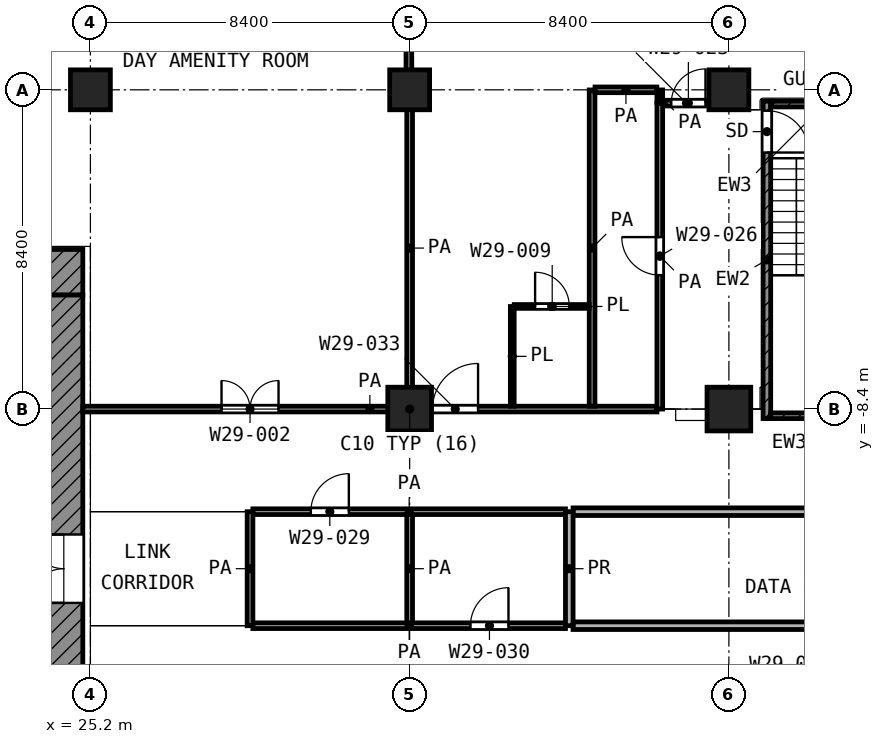
"""IFC4 building model, lengths in metres.
Left out: names, types, materials, properties, quantities, classifications, styles, units other than length and angle.
Written with IfcOpenShell. Run it as: python <this file> out.ifc"""

import sys

from ifc_helpers import new_model, si_unit, direction, frame, frame_2d, origin, origin_2d, place, context, subcontext, project, spatial, rectangle, extrude, element, fill, save


model = new_model("IFC4")
c1 = context("Model", 3, precision=1e-05, world=origin(), true_north=direction((0.0, 1.0)))
c2 = subcontext(c1, "Body", "Model", "MODEL_VIEW")
j1 = project(units=[si_unit("LENGTHUNIT", "METRE"), si_unit("PLANEANGLEUNIT", "RADIAN")], contexts=[c1])
p1 = place(None, origin())
s1 = spatial("IfcSite", under=j1, at=p1, CompositionType="ELEMENT")
p2 = place(p1, origin())
s2 = spatial("IfcBuilding", under=s1, at=p2, CompositionType="ELEMENT")
p3 = place(p2, frame((0.0, 0.0, 128.2)))
s3 = spatial("IfcBuildingStorey", under=s2, at=p3, CompositionType="ELEMENT", Elevation=128.2)
for number, where, z_axis, x_axis in (
    (1, (25.2, 0.0, 0.0), (0.0, 0.0, 1.0), (1.0, 0.0, 0.0)),
    (2, (33.6, 0.0, 0.0), (0.0, 0.0, 1.0), (1.0, 0.0, 0.0)),
    (3, (42.0, 0.0, 0.0), (0.0, 0.0, 1.0), (1.0, 0.0, 0.0)),
):
    element("IfcColumn", number, at=place(p3, frame(where, z_axis=z_axis, x_axis=x_axis)), inside=s3, PredefinedType="COLUMN", context=c2, shape_type="SweptSolid", body=[
        extrude(rectangle(XDim=1.05, YDim=1.05, at=origin_2d()), origin(), (0.0, 0.0, 1.0), 4.2),
    ])
for number, where, z_axis, x_axis in (
    (4, (33.6, -8.4, 0.0), (0.0, 0.0, 1.0), (1.0, 0.0, 0.0)),
    (5, (42.0, -8.4, 0.0), (0.0, 0.0, 1.0), (1.0, 0.0, 0.0)),
):
    element("IfcColumn", number, at=place(p3, frame(where, z_axis=z_axis, x_axis=x_axis)), inside=s3, PredefinedType="COLUMN", context=c2, shape_type="SweptSolid", body=[
        extrude(rectangle(XDim=1.15, YDim=1.15, at=origin_2d()), origin(), (0.0, 0.0, 1.0), 4.2),
    ])
p4 = place(p3, frame((4.2, -4.8, 0.0), z_axis=(0.0, 0.0, 1.0), x_axis=(1.0, 0.0, 0.0)))
e6 = element("IfcWall", 6, at=p4, inside=s3, PredefinedType="SHEAR", context=c2, shape_type="SweptSolid", body=[
    extrude(rectangle(XDim=20.8, YDim=1.2, at=frame_2d((10.4, 0.0))), origin(), (0.0, 0.0, 1.0), 3.6),
])
p5 = place(p4, frame((1.95, 0.0, 0.0)))
e7 = element("IfcOpeningElement", 7, at=p5, cuts=e6, PredefinedType="OPENING", context=c2, shape_type="SweptSolid", body=[
    extrude(rectangle(XDim=1.1, YDim=2.1, at=frame_2d((0.55, 1.05))), frame((0.0, 0.61, 0.0), z_axis=(0.0, -1.0, 0.0), x_axis=(1.0, 0.0, 0.0)), (0.0, 0.0, 1.0), 1.22),
])
p6 = place(p4, frame((17.95, 0.0, 0.0)))
e8 = element("IfcOpeningElement", 8, at=p6, cuts=e6, PredefinedType="OPENING", context=c2, shape_type="SweptSolid", body=[
    extrude(rectangle(XDim=1.1, YDim=2.1, at=frame_2d((0.55, 1.05))), frame((0.0, 0.61, 0.0), z_axis=(0.0, -1.0, 0.0), x_axis=(1.0, 0.0, 0.0)), (0.0, 0.0, 1.0), 1.22),
])
p7 = place(p3, frame((24.5, -24.0, 0.0), z_axis=(0.0, 0.0, 1.0), x_axis=(0.0, 1.0, 0.0)))
e9 = element("IfcWall", 9, at=p7, inside=s3, PredefinedType="SHEAR", context=c2, shape_type="SweptSolid", body=[
    extrude(rectangle(XDim=18.6, YDim=1.0, at=frame_2d((9.3, 0.0))), origin(), (0.0, 0.0, 1.0), 3.6),
])
p8 = place(p7, frame((10.5, 0.0, 0.0)))
e10 = element("IfcOpeningElement", 10, at=p8, cuts=e9, PredefinedType="OPENING", context=c2, shape_type="SweptSolid", body=[
    extrude(rectangle(XDim=1.8, YDim=2.1, at=frame_2d((0.9, 1.05))), frame((0.0, 0.51, 0.0), z_axis=(0.0, -1.0, 0.0), x_axis=(1.0, 0.0, 0.0)), (0.0, 0.0, 1.0), 1.02),
])
p9 = place(p3, frame((43.0, -8.65, 0.0), z_axis=(0.0, 0.0, 1.0), x_axis=(0.0, 1.0, 0.0)))
e11 = element("IfcWall", 11, at=p9, inside=s3, PredefinedType="SHEAR", context=c2, shape_type="SweptSolid", body=[
    extrude(rectangle(XDim=8.35, YDim=0.2, at=frame_2d((4.175, 0.0))), origin(), (0.0, 0.0, 1.0), 3.6),
])
p10 = place(p9, frame((7.0, 0.0, 0.0)))
e12 = element("IfcOpeningElement", 12, at=p10, cuts=e11, PredefinedType="OPENING", context=c2, shape_type="SweptSolid", body=[
    extrude(rectangle(XDim=1.1, YDim=2.1, at=frame_2d((0.55, 1.05))), frame((0.0, 0.11, 0.0), z_axis=(0.0, -1.0, 0.0), x_axis=(1.0, 0.0, 0.0)), (0.0, 0.0, 1.0), 0.22),
])
for number, where, z_axis, x_axis in (
    (13, (43.1, -0.375, 0.0), (0.0, 0.0, 1.0), (1.0, 0.0, 0.0)),
    (14, (43.1, -8.575, 0.0), (0.0, 0.0, 1.0), (1.0, 0.0, 0.0)),
):
    element("IfcWall", number, at=place(p3, frame(where, z_axis=z_axis, x_axis=x_axis)), inside=s3, PredefinedType="SHEAR", context=c2, shape_type="SweptSolid", body=[
        extrude(rectangle(XDim=2.85, YDim=0.15, at=frame_2d((1.425, 0.0))), origin(), (0.0, 0.0, 1.0), 3.6),
    ])
p11 = place(p3, frame((36.352, -5.7, 0.0), z_axis=(0.0, 0.0, 1.0), x_axis=(1.0, 0.0, 0.0)))
e15 = element("IfcWall", 15, at=p11, inside=s3, PredefinedType="PARTITIONING", context=c2, shape_type="SweptSolid", body=[
    extrude(rectangle(XDim=1.973, YDim=0.1, at=frame_2d((0.986, 0.0))), origin(), (0.0, 0.0, 1.0), 3.6),
])
p12 = place(p11, frame((0.549, 0.0, 0.0)))
e16 = element("IfcOpeningElement", 16, at=p12, cuts=e15, PredefinedType="OPENING", context=c2, shape_type="SweptSolid", body=[
    extrude(rectangle(XDim=0.9, YDim=2.1, at=frame_2d((0.45, 1.05))), frame((0.0, 0.06, 0.0), z_axis=(0.0, -1.0, 0.0), x_axis=(1.0, 0.0, 0.0)), (0.0, 0.0, 1.0), 0.12),
])
p13 = place(p3, frame((36.3, -8.325, 0.0), z_axis=(0.0, 0.0, 1.0), x_axis=(0.0, 1.0, 0.0)))
e17 = element("IfcWall", 17, at=p13, inside=s3, PredefinedType="PARTITIONING", context=c2, shape_type="SweptSolid", body=[
    extrude(rectangle(XDim=2.624, YDim=0.1, at=frame_2d((1.312, 0.0))), origin(), (0.0, 0.0, 1.0), 3.6),
])
p14 = place(p3, frame((29.475, -14.1, 0.0), z_axis=(0.0, 0.0, 1.0), x_axis=(1.0, 0.0, 0.0)))
e18 = element("IfcWall", 18, at=p14, inside=s3, PredefinedType="PARTITIONING", context=c2, shape_type="SweptSolid", body=[
    extrude(rectangle(XDim=8.225, YDim=0.15, at=frame_2d((4.112, 0.0))), origin(), (0.0, 0.0, 1.0), 3.6),
])
p15 = place(p14, frame((5.725, 0.0, 0.0)))
e19 = element("IfcOpeningElement", 19, at=p15, cuts=e18, PredefinedType="OPENING", context=c2, shape_type="SweptSolid", body=[
    extrude(rectangle(XDim=1.0, YDim=2.1, at=frame_2d((0.5, 1.05))), frame((0.0, 0.085, 0.0), z_axis=(0.0, -1.0, 0.0), x_axis=(1.0, 0.0, 0.0)), (0.0, 0.0, 1.0), 0.17),
])
p16 = place(p3, frame((29.475, -11.1, 0.0), z_axis=(0.0, 0.0, 1.0), x_axis=(1.0, 0.0, 0.0)))
e20 = element("IfcWall", 20, at=p16, inside=s3, PredefinedType="PARTITIONING", context=c2, shape_type="SweptSolid", body=[
    extrude(rectangle(XDim=8.225, YDim=0.15, at=frame_2d((4.112, 0.0))), origin(), (0.0, 0.0, 1.0), 3.6),
])
p17 = place(p16, frame((1.525, 0.0, 0.0)))
e21 = element("IfcOpeningElement", 21, at=p17, cuts=e20, PredefinedType="OPENING", context=c2, shape_type="SweptSolid", body=[
    extrude(rectangle(XDim=1.0, YDim=2.1, at=frame_2d((0.5, 1.05))), frame((0.0, 0.085, 0.0), z_axis=(0.0, -1.0, 0.0), x_axis=(1.0, 0.0, 0.0)), (0.0, 0.0, 1.0), 0.17),
])
p18 = place(p3, frame((25.0, -8.4, 0.0), z_axis=(0.0, 0.0, 1.0), x_axis=(1.0, 0.0, 0.0)))
e22 = element("IfcWall", 22, at=p18, inside=s3, PredefinedType="PARTITIONING", context=c2, shape_type="SweptSolid", body=[
    extrude(rectangle(XDim=15.107, YDim=0.15, at=frame_2d((7.553, 0.0))), origin(), (0.0, 0.0, 1.0), 3.6),
])
p19 = place(p18, frame((3.65, 0.0, 0.0)))
e23 = element("IfcOpeningElement", 23, at=p19, cuts=e22, PredefinedType="OPENING", context=c2, shape_type="SweptSolid", body=[
    extrude(rectangle(XDim=1.5, YDim=2.1, at=frame_2d((0.75, 1.05))), frame((0.0, 0.085, 0.0), z_axis=(0.0, -1.0, 0.0), x_axis=(1.0, 0.0, 0.0)), (0.0, 0.0, 1.0), 0.17),
])
p20 = place(p18, frame((9.2, 0.0, 0.0)))
e24 = element("IfcOpeningElement", 24, at=p20, cuts=e22, PredefinedType="OPENING", context=c2, shape_type="SweptSolid", body=[
    extrude(rectangle(XDim=1.2, YDim=2.1, at=frame_2d((0.6, 1.05))), frame((0.0, 0.085, 0.0), z_axis=(0.0, -1.0, 0.0), x_axis=(1.0, 0.0, 0.0)), (0.0, 0.0, 1.0), 0.17),
])
p21 = place(p3, frame((40.277, -0.35, 0.0), z_axis=(0.0, 0.0, 1.0), x_axis=(1.0, 0.0, 0.0)))
e25 = element("IfcWall", 25, at=p21, inside=s3, PredefinedType="PARTITIONING", context=c2, shape_type="SweptSolid", body=[
    extrude(rectangle(XDim=1.211, YDim=0.15, at=frame_2d((0.605, 0.0))), origin(), (0.0, 0.0, 1.0), 3.6),
])
p22 = place(p21, frame((0.207, 0.0, 0.0)))
e26 = element("IfcOpeningElement", 26, at=p22, cuts=e25, PredefinedType="OPENING", context=c2, shape_type="SweptSolid", body=[
    extrude(rectangle(XDim=0.9, YDim=2.1, at=frame_2d((0.45, 1.05))), frame((0.0, 0.085, 0.0), z_axis=(0.0, -1.0, 0.0), x_axis=(1.0, 0.0, 0.0)), (0.0, 0.0, 1.0), 0.17),
])
p23 = place(p3, frame((38.478, 0.0, 0.0), z_axis=(0.0, 0.0, 1.0), x_axis=(1.0, 0.0, 0.0)))
e27 = element("IfcWall", 27, at=p23, inside=s3, PredefinedType="PARTITIONING", context=c2, shape_type="SweptSolid", body=[
    extrude(rectangle(XDim=1.626, YDim=0.15, at=frame_2d((0.813, 0.0))), origin(), (0.0, 0.0, 1.0), 3.6),
])
p24 = place(p3, frame((29.4, -14.1, 0.0), z_axis=(0.0, 0.0, 1.0), x_axis=(0.0, 1.0, 0.0)))
e28 = element("IfcWall", 28, at=p24, inside=s3, PredefinedType="PARTITIONING", context=c2, shape_type="SweptSolid", body=[
    extrude(rectangle(XDim=3.0, YDim=0.15, at=frame_2d((1.5, 0.0))), origin(), (0.0, 0.0, 1.0), 3.6),
])
p25 = place(p3, frame((33.58, 0.02, 0.0), z_axis=(0.0, 0.0, 1.0), x_axis=(0.0, 1.0, 0.0)))
e29 = element("IfcWall", 29, at=p25, inside=s3, PredefinedType="PARTITIONING", context=c2, shape_type="SweptSolid", body=[
    extrude(rectangle(XDim=5.9, YDim=0.15, at=frame_2d((2.95, 0.0))), origin(), (0.0, 0.0, 1.0), 3.6),
])
p26 = place(p3, frame((33.6, -14.025, 0.0), z_axis=(0.0, 0.0, 1.0), x_axis=(0.0, 1.0, 0.0)))
e30 = element("IfcWall", 30, at=p26, inside=s3, PredefinedType="PARTITIONING", context=c2, shape_type="SweptSolid", body=[
    extrude(rectangle(XDim=2.85, YDim=0.15, at=frame_2d((1.425, 0.0))), origin(), (0.0, 0.0, 1.0), 3.6),
])
for number, where, z_axis, x_axis in (
    (31, (33.6, -8.325, 0.0), (0.0, 0.0, 1.0), (0.0, 1.0, 0.0)),
    (32, (38.4, -8.325, 0.0), (0.0, 0.0, 1.0), (0.0, 1.0, 0.0)),
):
    element("IfcWall", number, at=place(p3, frame(where, z_axis=z_axis, x_axis=x_axis)), inside=s3, PredefinedType="PARTITIONING", context=c2, shape_type="SweptSolid", body=[
        extrude(rectangle(XDim=8.322, YDim=0.15, at=frame_2d((4.161, 0.0))), origin(), (0.0, 0.0, 1.0), 3.6),
    ])
p27 = place(p3, frame((40.182, -8.4, 0.0), z_axis=(0.0, 0.0, 1.0), x_axis=(0.0, 1.0, 0.0)))
e33 = element("IfcWall", 33, at=p27, inside=s3, PredefinedType="PARTITIONING", context=c2, shape_type="SweptSolid", body=[
    extrude(rectangle(XDim=8.05, YDim=0.15, at=frame_2d((4.025, 0.0))), origin(), (0.0, 0.0, 1.0), 3.6),
])
p28 = place(p27, frame((3.525, 0.0, 0.0)))
e34 = element("IfcOpeningElement", 34, at=p28, cuts=e33, PredefinedType="OPENING", context=c2, shape_type="SweptSolid", body=[
    extrude(rectangle(XDim=1.0, YDim=2.1, at=frame_2d((0.5, 1.05))), frame((0.0, 0.085, 0.0), z_axis=(0.0, -1.0, 0.0), x_axis=(1.0, 0.0, 0.0)), (0.0, 0.0, 1.0), 0.17),
])
p29 = place(p3, frame((40.182, -0.33, 0.0), z_axis=(0.0, 0.0, 1.0), x_axis=(0.0, 1.0, 0.0)))
e35 = element("IfcWall", 35, at=p29, inside=s3, PredefinedType="PARTITIONING", context=c2, shape_type="SweptSolid", body=[
    extrude(rectangle(XDim=0.327, YDim=0.15, at=frame_2d((0.164, 0.0))), origin(), (0.0, 0.0, 1.0), 3.6),
])
p30 = place(p3, frame((37.9, -14.1, 0.0), z_axis=(0.0, 0.0, 1.0), x_axis=(1.0, 0.0, 0.0)))
e36 = element("IfcWall", 36, at=p30, inside=s3, PredefinedType="PARTITIONING", context=c2, shape_type="SweptSolid", body=[
    extrude(rectangle(XDim=16.3, YDim=0.2, at=frame_2d((8.15, 0.0))), origin(), (0.0, 0.0, 1.0), 3.6),
])
p31 = place(p3, frame((37.9, -11.1, 0.0), z_axis=(0.0, 0.0, 1.0), x_axis=(1.0, 0.0, 0.0)))
e37 = element("IfcWall", 37, at=p31, inside=s3, PredefinedType="PARTITIONING", context=c2, shape_type="SweptSolid", body=[
    extrude(rectangle(XDim=16.3, YDim=0.2, at=frame_2d((8.15, 0.0))), origin(), (0.0, 0.0, 1.0), 3.6),
])
p32 = place(p31, frame((7.55, 0.0, 0.0)))
e38 = element("IfcOpeningElement", 38, at=p32, cuts=e37, PredefinedType="OPENING", context=c2, shape_type="SweptSolid", body=[
    extrude(rectangle(XDim=1.2, YDim=2.1, at=frame_2d((0.6, 1.05))), frame((0.0, 0.11, 0.0), z_axis=(0.0, -1.0, 0.0), x_axis=(1.0, 0.0, 0.0)), (0.0, 0.0, 1.0), 0.22),
])
p33 = place(p3, frame((37.8, -14.1, 0.0), z_axis=(0.0, 0.0, 1.0), x_axis=(0.0, 1.0, 0.0)))
e39 = element("IfcWall", 39, at=p33, inside=s3, PredefinedType="PARTITIONING", context=c2, shape_type="SweptSolid", body=[
    extrude(rectangle(XDim=3.0, YDim=0.2, at=frame_2d((1.5, 0.0))), origin(), (0.0, 0.0, 1.0), 3.6),
])
p34 = place(p8, origin())
e40 = element("IfcDoor", 40, at=p34, inside=s3, OperationType="DOUBLE_DOOR_SINGLE_SWING", PredefinedType="DOOR", context=c2, shape_type="SweptSolid", body=[
    extrude(rectangle(XDim=1.8, YDim=2.1, at=frame_2d((0.9, 1.05))), frame((0.0, 0.025, 0.0), z_axis=(0.0, -1.0, 0.0), x_axis=(1.0, 0.0, 0.0)), (0.0, 0.0, 1.0), 0.05),
])
fill(e10, e40)
p35 = place(p10, frame((1.1, 0.0, 0.0), z_axis=(0.0, 0.0, 1.0), x_axis=(-1.0, 0.0, 0.0)))
e41 = element("IfcDoor", 41, at=p35, inside=s3, OperationType="SINGLE_SWING_LEFT", PredefinedType="DOOR", context=c2, shape_type="SweptSolid", body=[
    extrude(rectangle(XDim=1.1, YDim=2.1, at=frame_2d((0.55, 1.05))), frame((0.0, 0.025, 0.0), z_axis=(0.0, -1.0, 0.0), x_axis=(1.0, 0.0, 0.0)), (0.0, 0.0, 1.0), 0.05),
])
fill(e12, e41)
p36 = place(p19, origin())
e42 = element("IfcDoor", 42, at=p36, inside=s3, OperationType="DOUBLE_DOOR_SINGLE_SWING", PredefinedType="DOOR", context=c2, shape_type="SweptSolid", body=[
    extrude(rectangle(XDim=1.5, YDim=2.1, at=frame_2d((0.75, 1.05))), frame((0.0, 0.025, 0.0), z_axis=(0.0, -1.0, 0.0), x_axis=(1.0, 0.0, 0.0)), (0.0, 0.0, 1.0), 0.05),
])
fill(e23, e42)
p37 = place(p20, origin())
e43 = element("IfcDoor", 43, at=p37, inside=s3, OperationType="SINGLE_SWING_RIGHT", PredefinedType="DOOR", context=c2, shape_type="SweptSolid", body=[
    extrude(rectangle(XDim=1.2, YDim=2.1, at=frame_2d((0.6, 1.05))), frame((0.0, 0.025, 0.0), z_axis=(0.0, -1.0, 0.0), x_axis=(1.0, 0.0, 0.0)), (0.0, 0.0, 1.0), 0.05),
])
fill(e24, e43)
p38 = place(p22, origin())
e44 = element("IfcDoor", 44, at=p38, inside=s3, OperationType="SINGLE_SWING_RIGHT", PredefinedType="DOOR", context=c2, shape_type="SweptSolid", body=[
    extrude(rectangle(XDim=0.9, YDim=2.1, at=frame_2d((0.45, 1.05))), frame((0.0, 0.025, 0.0), z_axis=(0.0, -1.0, 0.0), x_axis=(1.0, 0.0, 0.0)), (0.0, 0.0, 1.0), 0.05),
])
fill(e26, e44)
p39 = place(p12, origin())
e45 = element("IfcDoor", 45, at=p39, inside=s3, OperationType="SINGLE_SWING_LEFT", PredefinedType="DOOR", context=c2, shape_type="SweptSolid", body=[
    extrude(rectangle(XDim=0.9, YDim=2.1, at=frame_2d((0.45, 1.05))), frame((0.0, 0.025, 0.0), z_axis=(0.0, -1.0, 0.0), x_axis=(1.0, 0.0, 0.0)), (0.0, 0.0, 1.0), 0.05),
])
fill(e16, e45)
p40 = place(p28, origin())
e46 = element("IfcDoor", 46, at=p40, inside=s3, OperationType="SINGLE_SWING_RIGHT", PredefinedType="DOOR", context=c2, shape_type="SweptSolid", body=[
    extrude(rectangle(XDim=1.0, YDim=2.1, at=frame_2d((0.5, 1.05))), frame((0.0, 0.025, 0.0), z_axis=(0.0, -1.0, 0.0), x_axis=(1.0, 0.0, 0.0)), (0.0, 0.0, 1.0), 0.05),
])
fill(e34, e46)
p41 = place(p17, origin())
e47 = element("IfcDoor", 47, at=p41, inside=s3, OperationType="SINGLE_SWING_RIGHT", PredefinedType="DOOR", context=c2, shape_type="SweptSolid", body=[
    extrude(rectangle(XDim=1.0, YDim=2.1, at=frame_2d((0.5, 1.05))), frame((0.0, 0.025, 0.0), z_axis=(0.0, -1.0, 0.0), x_axis=(1.0, 0.0, 0.0)), (0.0, 0.0, 1.0), 0.05),
])
fill(e21, e47)
p42 = place(p15, origin())
e48 = element("IfcDoor", 48, at=p42, inside=s3, OperationType="SINGLE_SWING_RIGHT", PredefinedType="DOOR", context=c2, shape_type="SweptSolid", body=[
    extrude(rectangle(XDim=1.0, YDim=2.1, at=frame_2d((0.5, 1.05))), frame((0.0, 0.025, 0.0), z_axis=(0.0, -1.0, 0.0), x_axis=(1.0, 0.0, 0.0)), (0.0, 0.0, 1.0), 0.05),
])
fill(e19, e48)
save(model, sys.argv[1])
